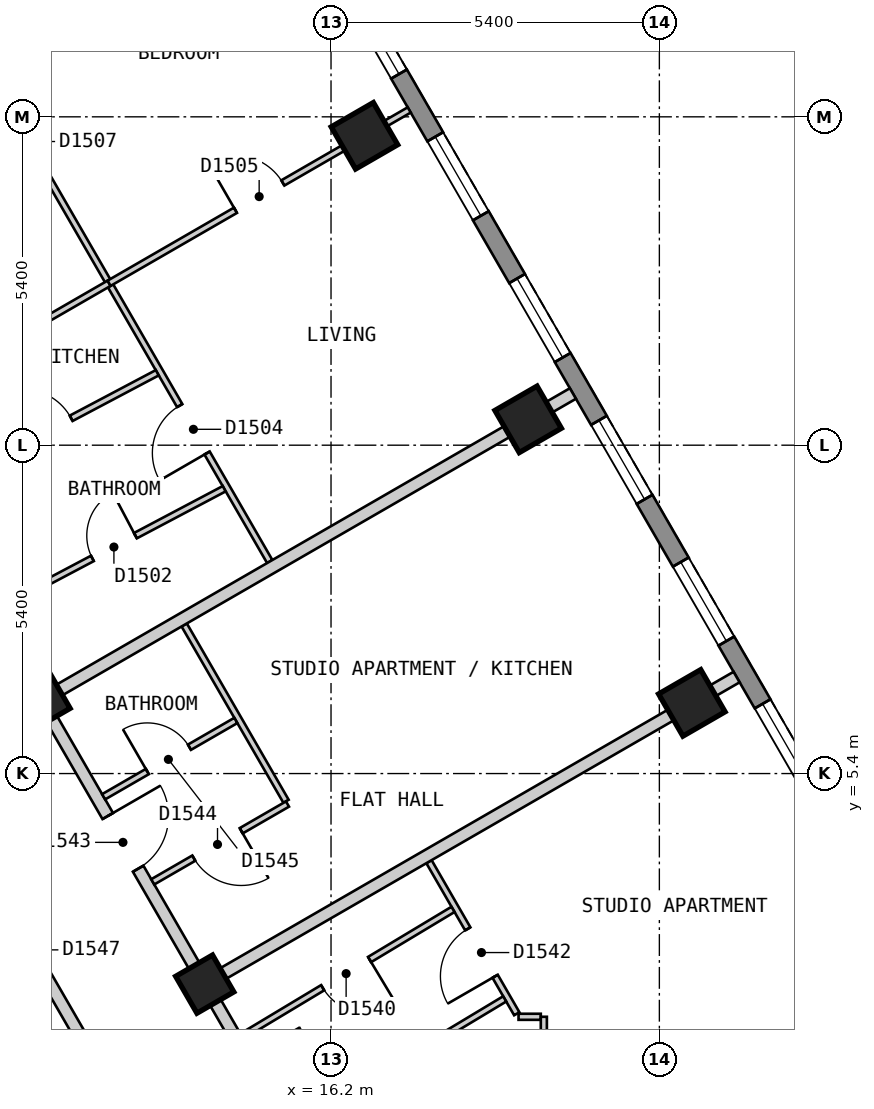
"""IFC4 building model, lengths in metres.
Left out: names, types, materials, properties, quantities, classifications, styles, units other than length and angle.
Written with IfcOpenShell. Run it as: python <this file> out.ifc"""

import sys

from ifc_helpers import new_model, si_unit, direction, frame, frame_2d, origin, origin_2d, place, context, subcontext, project, spatial, polyline, rectangle, outline, extrude, element, fill, save


model = new_model("IFC4")
c1 = context("Model", 3, precision=1e-05, world=origin(), true_north=direction((0.0, 1.0)))
c2 = subcontext(c1, "Body", "Model", "MODEL_VIEW")
j1 = project(units=[si_unit("LENGTHUNIT", "METRE"), si_unit("PLANEANGLEUNIT", "RADIAN")], contexts=[c1])
p1 = place(None, origin())
s1 = spatial("IfcSite", under=j1, at=p1, CompositionType="ELEMENT")
p2 = place(p1, origin())
s2 = spatial("IfcBuilding", under=s1, at=p2, CompositionType="ELEMENT")
p3 = place(p2, frame((0.0, 0.0, 196.2)))
s3 = spatial("IfcBuildingStorey", under=s2, at=p3, CompositionType="ELEMENT", Elevation=196.2)
for number, where, z_axis, x_axis in (
    (1, (22.134, 6.562, 0.0), (0.0, 0.0, 1.0), (-0.5, 0.866, 0.0)),
    (2, (19.442, 11.225, 0.0), (0.0, 0.0, 1.0), (-0.5, 0.866, 0.0)),
    (3, (16.75, 15.888, 0.0), (0.0, 0.0, 1.0), (-0.5, 0.866, 0.0)),
):
    element("IfcColumn", number, at=place(p3, frame(where, z_axis=z_axis, x_axis=x_axis)), inside=s3, PredefinedType="COLUMN", context=c2, shape_type="SweptSolid", body=[
        extrude(rectangle(XDim=0.8, YDim=0.8, at=origin_2d()), origin(), (0.0, 0.0, 1.0), 3.0),
    ])
for number, where, z_axis, x_axis in (
    (4, (14.123, 1.937, 0.0), (0.0, 0.0, 1.0), (-0.5, 0.866, 0.0)),
    (5, (11.431, 6.6, 0.0), (0.0, 0.0, 1.0), (-0.5, 0.866, 0.0)),
):
    element("IfcColumn", number, at=place(p3, frame(where, z_axis=z_axis, x_axis=x_axis)), inside=s3, PredefinedType="COLUMN", context=c2, shape_type="SweptSolid", body=[
        extrude(rectangle(XDim=0.7, YDim=0.7, at=origin_2d()), origin(), (0.0, 0.0, 1.0), 3.0),
    ])
p4 = place(p3, frame((26.024, 1.825, 0.0), z_axis=(0.0, 0.0, 1.0), x_axis=(-0.500010537973, 0.866019319597, 0.0)))
e6 = element("IfcWall", 6, at=p4, inside=s3, PredefinedType="SOLIDWALL", context=c2, shape_type="SweptSolid", body=[
    extrude(outline(polyline([(0.0, -0.15), (22.863, -0.15), (22.783, 0.15), (0.08, 0.15), (0.0, -0.15)])), origin(), (0.0, 0.0, 1.0), 2.6),
])
p5 = place(p4, frame((1.259, 0.0, 0.15)))
e7 = element("IfcOpeningElement", 7, at=p5, cuts=e6, PredefinedType="OPENING", context=c2, shape_type="SweptSolid", body=[
    extrude(rectangle(XDim=1.5, YDim=2.1, at=frame_2d((0.75, 1.05))), frame((0.0, 0.16, 0.0), z_axis=(0.0, -1.0, 0.0), x_axis=(1.0, 0.0, 0.0)), (0.0, 0.0, 1.0), 0.32),
])
p6 = place(p4, frame((3.952, 0.0, 0.15)))
e8 = element("IfcOpeningElement", 8, at=p6, cuts=e6, PredefinedType="OPENING", context=c2, shape_type="SweptSolid", body=[
    extrude(rectangle(XDim=1.5, YDim=2.1, at=frame_2d((0.75, 1.05))), frame((0.0, 0.16, 0.0), z_axis=(0.0, -1.0, 0.0), x_axis=(1.0, 0.0, 0.0)), (0.0, 0.0, 1.0), 0.32),
])
p7 = place(p4, frame((6.644, 0.0, 0.15)))
e9 = element("IfcOpeningElement", 9, at=p7, cuts=e6, PredefinedType="OPENING", context=c2, shape_type="SweptSolid", body=[
    extrude(rectangle(XDim=1.5, YDim=2.1, at=frame_2d((0.75, 1.05))), frame((0.0, 0.16, 0.0), z_axis=(0.0, -1.0, 0.0), x_axis=(1.0, 0.0, 0.0)), (0.0, 0.0, 1.0), 0.32),
])
p8 = place(p4, frame((9.335, 0.0, 0.15)))
e10 = element("IfcOpeningElement", 10, at=p8, cuts=e6, PredefinedType="OPENING", context=c2, shape_type="SweptSolid", body=[
    extrude(rectangle(XDim=1.5, YDim=2.1, at=frame_2d((0.75, 1.05))), frame((0.0, 0.16, 0.0), z_axis=(0.0, -1.0, 0.0), x_axis=(1.0, 0.0, 0.0)), (0.0, 0.0, 1.0), 0.32),
])
p9 = place(p4, frame((12.028, 0.0, 0.15)))
e11 = element("IfcOpeningElement", 11, at=p9, cuts=e6, PredefinedType="OPENING", context=c2, shape_type="SweptSolid", body=[
    extrude(rectangle(XDim=1.5, YDim=2.1, at=frame_2d((0.75, 1.05))), frame((0.0, 0.16, 0.0), z_axis=(0.0, -1.0, 0.0), x_axis=(1.0, 0.0, 0.0)), (0.0, 0.0, 1.0), 0.32),
])
p10 = place(p4, frame((14.72, 0.0, 0.15)))
e12 = element("IfcOpeningElement", 12, at=p10, cuts=e6, PredefinedType="OPENING", context=c2, shape_type="SweptSolid", body=[
    extrude(rectangle(XDim=1.5, YDim=2.1, at=frame_2d((0.75, 1.05))), frame((0.0, 0.16, 0.0), z_axis=(0.0, -1.0, 0.0), x_axis=(1.0, 0.0, 0.0)), (0.0, 0.0, 1.0), 0.32),
])
p11 = place(p4, frame((17.411, 0.0, 0.15)))
e13 = element("IfcOpeningElement", 13, at=p11, cuts=e6, PredefinedType="OPENING", context=c2, shape_type="SweptSolid", body=[
    extrude(rectangle(XDim=1.5, YDim=2.1, at=frame_2d((0.75, 1.05))), frame((0.0, 0.16, 0.0), z_axis=(0.0, -1.0, 0.0), x_axis=(1.0, 0.0, 0.0)), (0.0, 0.0, 1.0), 0.32),
])
p12 = place(p4, frame((20.104, 0.0, 0.15)))
e14 = element("IfcOpeningElement", 14, at=p12, cuts=e6, PredefinedType="OPENING", context=c2, shape_type="SweptSolid", body=[
    extrude(rectangle(XDim=1.5, YDim=2.1, at=frame_2d((0.75, 1.05))), frame((0.0, 0.16, 0.0), z_axis=(0.0, -1.0, 0.0), x_axis=(1.0, 0.0, 0.0)), (0.0, 0.0, 1.0), 0.32),
])
p13 = place(p3, frame((9.469, 5.6, 0.0), z_axis=(0.0, 0.0, 1.0), x_axis=(0.499964524401, -0.866045884662, 0.0)))
e15 = element("IfcWall", 15, at=p13, inside=s3, PredefinedType="PARTITIONING", context=c2, shape_type="SweptSolid", body=[
    extrude(rectangle(XDim=7.042, YDim=0.2, at=frame_2d((3.521, 0.0))), origin(), (0.0, 0.0, 1.0), 2.6),
])
p14 = place(p13, frame((3.129, 0.0, 0.0)))
e16 = element("IfcOpeningElement", 16, at=p14, cuts=e15, PredefinedType="OPENING", context=c2, shape_type="SweptSolid", body=[
    extrude(rectangle(XDim=0.9, YDim=2.1, at=frame_2d((0.45, 1.05))), frame((0.0, 0.11, 0.0), z_axis=(0.0, -1.0, 0.0), x_axis=(1.0, 0.0, 0.0)), (0.0, 0.0, 1.0), 0.22),
])
p15 = place(p3, frame((10.739, 7.8, 0.0), z_axis=(0.0, 0.0, 1.0), x_axis=(0.500023726918, -0.866011704609, 0.0)))
e17 = element("IfcWall", 17, at=p15, inside=s3, PredefinedType="PARTITIONING", context=c2, shape_type="SweptSolid", body=[
    extrude(rectangle(XDim=9.47, YDim=0.2, at=frame_2d((4.735, 0.0))), origin(), (0.0, 0.0, 1.0), 2.6),
])
p16 = place(p15, frame((8.168, 0.0, 0.0)))
e18 = element("IfcOpeningElement", 18, at=p16, cuts=e17, PredefinedType="OPENING", context=c2, shape_type="SweptSolid", body=[
    extrude(rectangle(XDim=1.0, YDim=2.1, at=frame_2d((0.5, 1.05))), frame((0.0, 0.11, 0.0), z_axis=(0.0, -1.0, 0.0), x_axis=(1.0, 0.0, 0.0)), (0.0, 0.0, 1.0), 0.22),
])
p17 = place(p15, frame((3.578, 0.0, 0.0)))
e19 = element("IfcOpeningElement", 19, at=p17, cuts=e17, PredefinedType="OPENING", context=c2, shape_type="SweptSolid", body=[
    extrude(rectangle(XDim=1.0, YDim=2.1, at=frame_2d((0.5, 1.05))), frame((0.0, 0.11, 0.0), z_axis=(0.0, -1.0, 0.0), x_axis=(1.0, 0.0, 0.0)), (0.0, 0.0, 1.0), 0.22),
])
p18 = place(p3, frame((13.785, 7.844, 0.0), z_axis=(0.0, 0.0, 1.0), x_axis=(0.500176784828, -0.865923312955, 0.0)))
e20 = element("IfcWall", 20, at=p18, inside=s3, PredefinedType="PARTITIONING", context=c2, shape_type="SweptSolid", body=[
    extrude(rectangle(XDim=3.349, YDim=0.1, at=frame_2d((1.674, 0.0))), origin(), (0.0, 0.0, 1.0), 2.6),
])
p19 = place(p3, frame((17.811, 3.951, 0.0), z_axis=(0.0, 0.0, 1.0), x_axis=(0.499976149225, -0.866039173598, 0.0)))
e21 = element("IfcWall", 21, at=p19, inside=s3, PredefinedType="PARTITIONING", context=c2, shape_type="SweptSolid", body=[
    extrude(rectangle(XDim=2.888, YDim=0.1, at=frame_2d((1.444, 0.0))), origin(), (0.0, 0.0, 1.0), 2.6),
])
p20 = place(p19, frame((1.276, 0.0, 0.0)))
e22 = element("IfcOpeningElement", 22, at=p20, cuts=e21, PredefinedType="OPENING", context=c2, shape_type="SweptSolid", body=[
    extrude(rectangle(XDim=0.9, YDim=2.1, at=frame_2d((0.45, 1.05))), frame((0.0, 0.06, 0.0), z_axis=(0.0, -1.0, 0.0), x_axis=(1.0, 0.0, 0.0)), (0.0, 0.0, 1.0), 0.12),
])
p21 = place(p3, frame((9.883, 18.082, 0.0), z_axis=(0.0, 0.0, 1.0), x_axis=(0.500004428835, -0.86602284678, 0.0)))
e23 = element("IfcWall", 23, at=p21, inside=s3, PredefinedType="PARTITIONING", context=c2, shape_type="SweptSolid", body=[
    extrude(rectangle(XDim=10.618, YDim=0.1, at=frame_2d((5.309, 0.0))), origin(), (0.0, 0.0, 1.0), 2.6),
])
p22 = place(p21, frame((7.657, 0.0, 0.0)))
e24 = element("IfcOpeningElement", 24, at=p22, cuts=e23, PredefinedType="OPENING", context=c2, shape_type="SweptSolid", body=[
    extrude(rectangle(XDim=0.9, YDim=2.1, at=frame_2d((0.45, 1.05))), frame((0.0, 0.06, 0.0), z_axis=(0.0, -1.0, 0.0), x_axis=(1.0, 0.0, 0.0)), (0.0, 0.0, 1.0), 0.12),
])
p23 = place(p21, frame((2.242, 0.0, 0.0)))
e25 = element("IfcOpeningElement", 25, at=p23, cuts=e23, PredefinedType="OPENING", context=c2, shape_type="SweptSolid", body=[
    extrude(rectangle(XDim=0.8, YDim=2.1, at=frame_2d((0.4, 1.05))), frame((0.0, 0.06, 0.0), z_axis=(0.0, -1.0, 0.0), x_axis=(1.0, 0.0, 0.0)), (0.0, 0.0, 1.0), 0.12),
])
p24 = place(p3, frame((19.284, 1.4, 0.0), z_axis=(0.0, 0.0, 1.0), x_axis=(1.0, 0.0, 0.0)))
e26 = element("IfcWall", 26, at=p24, inside=s3, PredefinedType="PARTITIONING", context=c2, shape_type="SweptSolid", body=[
    extrude(rectangle(XDim=0.366, YDim=0.1, at=frame_2d((0.183, 0.0))), origin(), (0.0, 0.0, 1.0), 2.6),
])
p25 = place(p3, frame((19.7, 0.679, 0.0), z_axis=(0.0, 0.0, 1.0), x_axis=(0.0, 1.0, 0.0)))
e27 = element("IfcWall", 27, at=p25, inside=s3, PredefinedType="PARTITIONING", context=c2, shape_type="SweptSolid", body=[
    extrude(rectangle(XDim=0.721, YDim=0.1, at=frame_2d((0.36, 0.0))), origin(), (0.0, 0.0, 1.0), 2.6),
])
p26 = place(p3, frame((9.76, 10.096, 0.0), z_axis=(0.0, 0.0, 1.0), x_axis=(0.883925629136, 0.467627503636, 0.0)))
e28 = element("IfcWall", 28, at=p26, inside=s3, PredefinedType="PARTITIONING", context=c2, shape_type="SweptSolid", body=[
    extrude(rectangle(XDim=4.052, YDim=0.1, at=frame_2d((2.026, 0.0))), origin(), (0.0, 0.0, 1.0), 2.6),
])
p27 = place(p26, frame((1.551, 0.0, 0.0)))
e29 = element("IfcOpeningElement", 29, at=p27, cuts=e28, PredefinedType="OPENING", context=c2, shape_type="SweptSolid", body=[
    extrude(rectangle(XDim=0.9, YDim=2.1, at=frame_2d((0.45, 1.05))), frame((0.0, 0.06, 0.0), z_axis=(0.0, -1.0, 0.0), x_axis=(1.0, 0.0, 0.0)), (0.0, 0.0, 1.0), 0.12),
])
p28 = place(p3, frame((10.772, 8.143, 0.0), z_axis=(0.0, 0.0, 1.0), x_axis=(0.884049480227, 0.467393320995, 0.0)))
e30 = element("IfcWall", 30, at=p28, inside=s3, PredefinedType="PARTITIONING", context=c2, shape_type="SweptSolid", body=[
    extrude(rectangle(XDim=4.153, YDim=0.1, at=frame_2d((2.076, 0.0))), origin(), (0.0, 0.0, 1.0), 2.6),
])
p29 = place(p28, frame((1.701, 0.0, 0.0)))
e31 = element("IfcOpeningElement", 31, at=p29, cuts=e30, PredefinedType="OPENING", context=c2, shape_type="SweptSolid", body=[
    extrude(rectangle(XDim=0.8, YDim=2.1, at=frame_2d((0.4, 1.05))), frame((0.0, 0.06, 0.0), z_axis=(0.0, -1.0, 0.0), x_axis=(1.0, 0.0, 0.0)), (0.0, 0.0, 1.0), 0.12),
])
p30 = place(p3, frame((13.268, 3.619, 0.0), z_axis=(0.0, 0.0, 1.0), x_axis=(0.865902724456, 0.500212426655, 0.0)))
e32 = element("IfcWall", 32, at=p30, inside=s3, PredefinedType="PARTITIONING", context=c2, shape_type="SweptSolid", body=[
    extrude(rectangle(XDim=2.559, YDim=0.1, at=frame_2d((1.28, 0.0))), origin(), (0.0, 0.0, 1.0), 2.6),
])
p31 = place(p30, frame((0.78, 0.0, 0.0)))
e33 = element("IfcOpeningElement", 33, at=p31, cuts=e32, PredefinedType="OPENING", context=c2, shape_type="SweptSolid", body=[
    extrude(rectangle(XDim=0.9, YDim=2.1, at=frame_2d((0.45, 1.05))), frame((0.0, 0.06, 0.0), z_axis=(0.0, -1.0, 0.0), x_axis=(1.0, 0.0, 0.0)), (0.0, 0.0, 1.0), 0.12),
])
p32 = place(p3, frame((12.46, 5.018, 0.0), z_axis=(0.0, 0.0, 1.0), x_axis=(0.866080321209, 0.499904868165, 0.0)))
e34 = element("IfcWall", 34, at=p32, inside=s3, PredefinedType="PARTITIONING", context=c2, shape_type="SweptSolid", body=[
    extrude(rectangle(XDim=2.51, YDim=0.1, at=frame_2d((1.255, 0.0))), origin(), (0.0, 0.0, 1.0), 2.6),
])
p33 = place(p32, frame((0.83, 0.0, 0.0)))
e35 = element("IfcOpeningElement", 35, at=p33, cuts=e34, PredefinedType="OPENING", context=c2, shape_type="SweptSolid", body=[
    extrude(rectangle(XDim=0.8, YDim=2.1, at=frame_2d((0.4, 1.05))), frame((0.0, 0.06, 0.0), z_axis=(0.0, -1.0, 0.0), x_axis=(1.0, 0.0, 0.0)), (0.0, 0.0, 1.0), 0.12),
])
p34 = place(p3, frame((8.999, 11.413, 0.0), z_axis=(0.0, 0.0, 1.0), x_axis=(0.86606561423, 0.499930346997, 0.0)))
e36 = element("IfcWall", 36, at=p34, inside=s3, PredefinedType="PARTITIONING", context=c2, shape_type="SweptSolid", body=[
    extrude(rectangle(XDim=4.1, YDim=0.1, at=frame_2d((2.05, 0.0))), origin(), (0.0, 0.0, 1.0), 2.6),
])
p35 = place(p3, frame((14.734, 1.08, 0.0), z_axis=(0.0, 0.0, 1.0), x_axis=(0.857205608004, 0.514974315482, 0.0)))
e37 = element("IfcWall", 37, at=p35, inside=s3, PredefinedType="PARTITIONING", context=c2, shape_type="SweptSolid", body=[
    extrude(rectangle(XDim=4.051, YDim=0.1, at=frame_2d((2.025, 0.0))), origin(), (0.0, 0.0, 1.0), 2.6),
])
p36 = place(p35, frame((1.55, 0.0, 0.0)))
e38 = element("IfcOpeningElement", 38, at=p36, cuts=e37, PredefinedType="OPENING", context=c2, shape_type="SweptSolid", body=[
    extrude(rectangle(XDim=0.9, YDim=2.1, at=frame_2d((0.45, 1.05))), frame((0.0, 0.06, 0.0), z_axis=(0.0, -1.0, 0.0), x_axis=(1.0, 0.0, 0.0)), (0.0, 0.0, 1.0), 0.12),
])
p37 = place(p3, frame((15.499, -0.444, 0.0), z_axis=(0.0, 0.0, 1.0), x_axis=(0.857061798163, 0.515213619899, 0.0)))
e39 = element("IfcWall", 39, at=p37, inside=s3, PredefinedType="PARTITIONING", context=c2, shape_type="SweptSolid", body=[
    extrude(rectangle(XDim=4.15, YDim=0.1, at=frame_2d((2.075, 0.0))), origin(), (0.0, 0.0, 1.0), 2.6),
])
p38 = place(p37, frame((1.7, 0.0, 0.0)))
e40 = element("IfcOpeningElement", 40, at=p38, cuts=e39, PredefinedType="OPENING", context=c2, shape_type="SweptSolid", body=[
    extrude(rectangle(XDim=0.8, YDim=2.1, at=frame_2d((0.4, 1.05))), frame((0.0, 0.06, 0.0), z_axis=(0.0, -1.0, 0.0), x_axis=(1.0, 0.0, 0.0)), (0.0, 0.0, 1.0), 0.12),
])
p39 = place(p3, frame((14.21, 1.987, 0.0), z_axis=(0.0, 0.0, 1.0), x_axis=(0.866022959057, 0.500004234368, 0.0)))
e41 = element("IfcWall", 41, at=p39, inside=s3, PredefinedType="PARTITIONING", context=c2, shape_type="SweptSolid", body=[
    extrude(rectangle(XDim=10.0, YDim=0.2, at=frame_2d((5.0, 0.0))), origin(), (0.0, 0.0, 1.0), 2.6),
])
p40 = place(p3, frame((11.518, 6.65, 0.0), z_axis=(0.0, 0.0, 1.0), x_axis=(0.866016855193, 0.500014806302, 0.0)))
e42 = element("IfcWall", 42, at=p40, inside=s3, PredefinedType="PARTITIONING", context=c2, shape_type="SweptSolid", body=[
    extrude(rectangle(XDim=10.0, YDim=0.2, at=frame_2d((5.0, 0.0))), origin(), (0.0, 0.0, 1.0), 2.6),
])
p41 = place(p3, frame((12.55, 13.463, 0.0), z_axis=(0.0, 0.0, 1.0), x_axis=(0.866004402611, 0.500036373335, 0.0)))
e43 = element("IfcWall", 43, at=p41, inside=s3, PredefinedType="PARTITIONING", context=c2, shape_type="SweptSolid", body=[
    extrude(rectangle(XDim=5.7, YDim=0.1, at=frame_2d((2.85, 0.0))), origin(), (0.0, 0.0, 1.0), 2.6),
])
p42 = place(p41, frame((2.4, 0.0, 0.0)))
e44 = element("IfcOpeningElement", 44, at=p42, cuts=e43, PredefinedType="OPENING", context=c2, shape_type="SweptSolid", body=[
    extrude(rectangle(XDim=0.9, YDim=2.1, at=frame_2d((0.45, 1.05))), frame((0.0, 0.06, 0.0), z_axis=(0.0, -1.0, 0.0), x_axis=(1.0, 0.0, 0.0)), (0.0, 0.0, 1.0), 0.12),
])
p43 = place(p6, origin())
e45 = element("IfcWindow", 45, at=p43, inside=s3, PartitioningType="SINGLE_PANEL", PredefinedType="WINDOW", context=c2, shape_type="SweptSolid", body=[
    extrude(rectangle(XDim=1.5, YDim=2.1, at=frame_2d((0.75, 1.05))), frame((0.0, 0.03, 0.0), z_axis=(0.0, -1.0, 0.0), x_axis=(1.0, 0.0, 0.0)), (0.0, 0.0, 1.0), 0.06),
])
fill(e8, e45)
p44 = place(p7, origin())
e46 = element("IfcWindow", 46, at=p44, inside=s3, PartitioningType="SINGLE_PANEL", PredefinedType="WINDOW", context=c2, shape_type="SweptSolid", body=[
    extrude(rectangle(XDim=1.5, YDim=2.1, at=frame_2d((0.75, 1.05))), frame((0.0, 0.03, 0.0), z_axis=(0.0, -1.0, 0.0), x_axis=(1.0, 0.0, 0.0)), (0.0, 0.0, 1.0), 0.06),
])
fill(e9, e46)
p45 = place(p8, origin())
e47 = element("IfcWindow", 47, at=p45, inside=s3, PartitioningType="SINGLE_PANEL", PredefinedType="WINDOW", context=c2, shape_type="SweptSolid", body=[
    extrude(rectangle(XDim=1.5, YDim=2.1, at=frame_2d((0.75, 1.05))), frame((0.0, 0.03, 0.0), z_axis=(0.0, -1.0, 0.0), x_axis=(1.0, 0.0, 0.0)), (0.0, 0.0, 1.0), 0.06),
])
fill(e10, e47)
p46 = place(p9, origin())
e48 = element("IfcWindow", 48, at=p46, inside=s3, PartitioningType="SINGLE_PANEL", PredefinedType="WINDOW", context=c2, shape_type="SweptSolid", body=[
    extrude(rectangle(XDim=1.5, YDim=2.1, at=frame_2d((0.75, 1.05))), frame((0.0, 0.03, 0.0), z_axis=(0.0, -1.0, 0.0), x_axis=(1.0, 0.0, 0.0)), (0.0, 0.0, 1.0), 0.06),
])
fill(e11, e48)
p47 = place(p10, origin())
e49 = element("IfcWindow", 49, at=p47, inside=s3, PartitioningType="SINGLE_PANEL", PredefinedType="WINDOW", context=c2, shape_type="SweptSolid", body=[
    extrude(rectangle(XDim=1.5, YDim=2.1, at=frame_2d((0.75, 1.05))), frame((0.0, 0.03, 0.0), z_axis=(0.0, -1.0, 0.0), x_axis=(1.0, 0.0, 0.0)), (0.0, 0.0, 1.0), 0.06),
])
fill(e12, e49)
p48 = place(p11, origin())
e50 = element("IfcWindow", 50, at=p48, inside=s3, PartitioningType="SINGLE_PANEL", PredefinedType="WINDOW", context=c2, shape_type="SweptSolid", body=[
    extrude(rectangle(XDim=1.5, YDim=2.1, at=frame_2d((0.75, 1.05))), frame((0.0, 0.03, 0.0), z_axis=(0.0, -1.0, 0.0), x_axis=(1.0, 0.0, 0.0)), (0.0, 0.0, 1.0), 0.06),
])
fill(e13, e50)
p49 = place(p29, origin())
e51 = element("IfcDoor", 51, at=p49, inside=s3, OperationType="SINGLE_SWING_RIGHT", PredefinedType="DOOR", context=c2, shape_type="SweptSolid", body=[
    extrude(rectangle(XDim=0.8, YDim=2.1, at=frame_2d((0.4, 1.05))), frame((0.0, 0.025, 0.0), z_axis=(0.0, -1.0, 0.0), x_axis=(1.0, 0.0, 0.0)), (0.0, 0.0, 1.0), 0.05),
])
fill(e31, e51)
p50 = place(p27, origin())
e52 = element("IfcDoor", 52, at=p50, inside=s3, OperationType="SINGLE_SWING_LEFT", PredefinedType="DOOR", context=c2, shape_type="SweptSolid", body=[
    extrude(rectangle(XDim=0.9, YDim=2.1, at=frame_2d((0.45, 1.05))), frame((0.0, 0.025, 0.0), z_axis=(0.0, -1.0, 0.0), x_axis=(1.0, 0.0, 0.0)), (0.0, 0.0, 1.0), 0.05),
])
fill(e29, e52)
p51 = place(p22, origin())
e53 = element("IfcDoor", 53, at=p51, inside=s3, OperationType="SINGLE_SWING_RIGHT", PredefinedType="DOOR", context=c2, shape_type="SweptSolid", body=[
    extrude(rectangle(XDim=0.9, YDim=2.1, at=frame_2d((0.45, 1.05))), frame((0.0, 0.025, 0.0), z_axis=(0.0, -1.0, 0.0), x_axis=(1.0, 0.0, 0.0)), (0.0, 0.0, 1.0), 0.05),
])
fill(e24, e53)
p52 = place(p42, origin())
e54 = element("IfcDoor", 54, at=p52, inside=s3, OperationType="SINGLE_SWING_LEFT", PredefinedType="DOOR", context=c2, shape_type="SweptSolid", body=[
    extrude(rectangle(XDim=0.9, YDim=2.1, at=frame_2d((0.45, 1.05))), frame((0.0, 0.025, 0.0), z_axis=(0.0, -1.0, 0.0), x_axis=(1.0, 0.0, 0.0)), (0.0, 0.0, 1.0), 0.05),
])
fill(e44, e54)
p53 = place(p36, origin())
e55 = element("IfcDoor", 55, at=p53, inside=s3, OperationType="SINGLE_SWING_RIGHT", PredefinedType="DOOR", context=c2, shape_type="SweptSolid", body=[
    extrude(rectangle(XDim=0.9, YDim=2.1, at=frame_2d((0.45, 1.05))), frame((0.0, 0.025, 0.0), z_axis=(0.0, -1.0, 0.0), x_axis=(1.0, 0.0, 0.0)), (0.0, 0.0, 1.0), 0.05),
])
fill(e38, e55)
p54 = place(p20, origin())
e56 = element("IfcDoor", 56, at=p54, inside=s3, OperationType="SINGLE_SWING_RIGHT", PredefinedType="DOOR", context=c2, shape_type="SweptSolid", body=[
    extrude(rectangle(XDim=0.9, YDim=2.1, at=frame_2d((0.45, 1.05))), frame((0.0, 0.025, 0.0), z_axis=(0.0, -1.0, 0.0), x_axis=(1.0, 0.0, 0.0)), (0.0, 0.0, 1.0), 0.05),
])
fill(e22, e56)
p55 = place(p17, origin())
e57 = element("IfcDoor", 57, at=p55, inside=s3, OperationType="SINGLE_SWING_LEFT", PredefinedType="DOOR", context=c2, shape_type="SweptSolid", body=[
    extrude(rectangle(XDim=1.0, YDim=2.1, at=frame_2d((0.5, 1.05))), frame((0.0, 0.025, 0.0), z_axis=(0.0, -1.0, 0.0), x_axis=(1.0, 0.0, 0.0)), (0.0, 0.0, 1.0), 0.05),
])
fill(e19, e57)
p56 = place(p31, origin())
e58 = element("IfcDoor", 58, at=p56, inside=s3, OperationType="SINGLE_SWING_RIGHT", PredefinedType="DOOR", context=c2, shape_type="SweptSolid", body=[
    extrude(rectangle(XDim=0.9, YDim=2.1, at=frame_2d((0.45, 1.05))), frame((0.0, 0.025, 0.0), z_axis=(0.0, -1.0, 0.0), x_axis=(1.0, 0.0, 0.0)), (0.0, 0.0, 1.0), 0.05),
])
fill(e33, e58)
p57 = place(p33, origin())
e59 = element("IfcDoor", 59, at=p57, inside=s3, OperationType="SINGLE_SWING_LEFT", PredefinedType="DOOR", context=c2, shape_type="SweptSolid", body=[
    extrude(rectangle(XDim=0.8, YDim=2.1, at=frame_2d((0.4, 1.05))), frame((0.0, 0.025, 0.0), z_axis=(0.0, -1.0, 0.0), x_axis=(1.0, 0.0, 0.0)), (0.0, 0.0, 1.0), 0.05),
])
fill(e35, e59)
save(model, sys.argv[1])
